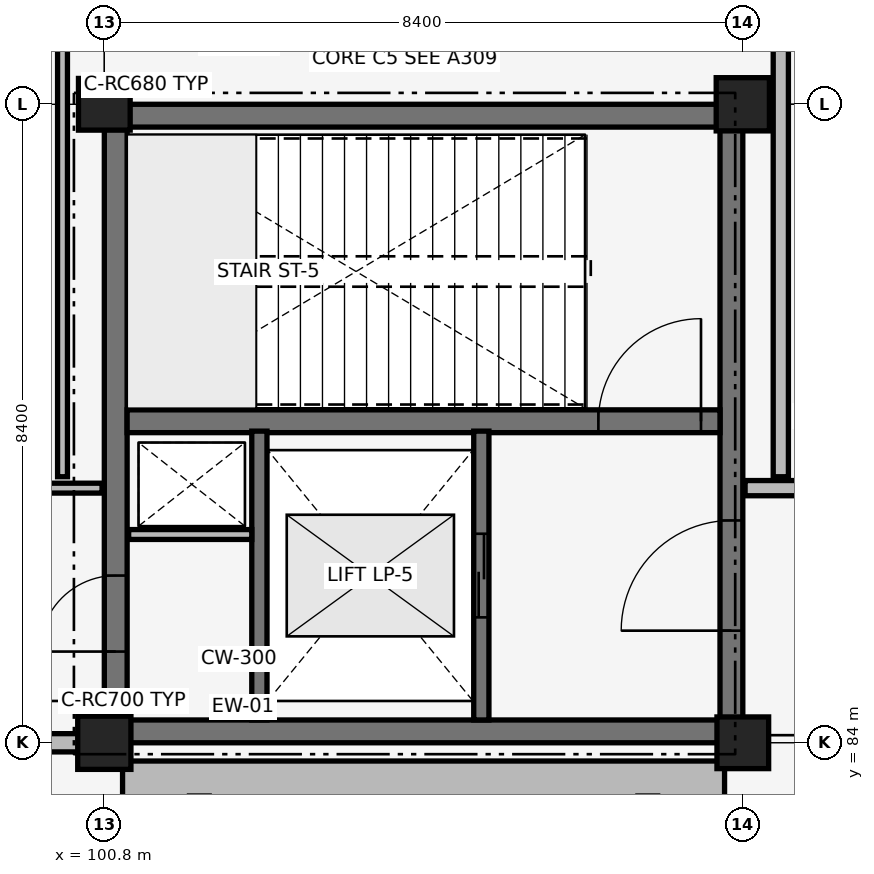
"""IFC4 building model, lengths in metres.
Left out: names, types, materials, properties, quantities, classifications, styles, units other than length and angle.
Written with IfcOpenShell. Run it as: python <this file> out.ifc"""

import sys

from ifc_helpers import new_model, si_unit, direction, frame, frame_2d, origin, origin_2d, place, context, subcontext, project, spatial, rectangle, extrude, element, fill, save


model = new_model("IFC4")
c1 = context("Model", 3, precision=1e-05, world=origin(), true_north=direction((0.0, 1.0)))
c2 = subcontext(c1, "Body", "Model", "MODEL_VIEW")
j1 = project(units=[si_unit("LENGTHUNIT", "METRE"), si_unit("PLANEANGLEUNIT", "RADIAN")], contexts=[c1])
p1 = place(None, origin())
s1 = spatial("IfcSite", under=j1, at=p1, CompositionType="ELEMENT")
p2 = place(p1, origin())
s2 = spatial("IfcBuilding", under=s1, at=p2, CompositionType="ELEMENT")
p3 = place(p2, origin())
s3 = spatial("IfcBuildingStorey", under=s2, at=p3, CompositionType="ELEMENT", Elevation=0.0)
for number, where, z_axis, x_axis in (
    (1, (100.95, 84.15, 0.0), (0.0, 0.0, 1.0), (1.0, 0.0, 0.0)),
    (2, (100.95, 92.25, 0.0), (0.0, 0.0, 1.0), (1.0, 0.0, 0.0)),
):
    element("IfcWall", number, at=place(p3, frame(where, z_axis=z_axis, x_axis=x_axis)), inside=s3, PredefinedType="SHEAR", context=c2, shape_type="SweptSolid", body=[
        extrude(rectangle(XDim=8.1, YDim=0.3, at=frame_2d((4.05, 0.0))), origin(), (0.0, 0.0, 1.0), 5.14),
    ])
p4 = place(p3, frame((100.95, 84.15, 0.0), z_axis=(0.0, 0.0, 1.0), x_axis=(0.0, 1.0, 0.0)))
e3 = element("IfcWall", 3, at=p4, inside=s3, PredefinedType="SHEAR", context=c2, shape_type="SweptSolid", body=[
    extrude(rectangle(XDim=8.1, YDim=0.3, at=frame_2d((4.05, 0.0))), origin(), (0.0, 0.0, 1.0), 5.14),
])
p5 = place(p4, frame((1.05, 0.0, 0.0)))
e4 = element("IfcOpeningElement", 4, at=p5, cuts=e3, PredefinedType="OPENING", context=c2, shape_type="SweptSolid", body=[
    extrude(rectangle(XDim=1.0, YDim=2.15, at=frame_2d((0.5, 1.075))), frame((0.0, 0.16, 0.0), z_axis=(0.0, -1.0, 0.0), x_axis=(1.0, 0.0, 0.0)), (0.0, 0.0, 1.0), 0.32),
])
p6 = place(p3, frame((109.05, 84.15, 0.0), z_axis=(0.0, 0.0, 1.0), x_axis=(0.0, 1.0, 0.0)))
e5 = element("IfcWall", 5, at=p6, inside=s3, PredefinedType="SHEAR", context=c2, shape_type="SweptSolid", body=[
    extrude(rectangle(XDim=8.1, YDim=0.3, at=frame_2d((4.05, 0.0))), origin(), (0.0, 0.0, 1.0), 5.14),
])
p7 = place(p6, frame((1.325, 0.0, 0.0)))
e6 = element("IfcOpeningElement", 6, at=p7, cuts=e5, PredefinedType="OPENING", context=c2, shape_type="SweptSolid", body=[
    extrude(rectangle(XDim=1.45, YDim=2.15, at=frame_2d((0.725, 1.075))), frame((0.0, 0.16, 0.0), z_axis=(0.0, -1.0, 0.0), x_axis=(1.0, 0.0, 0.0)), (0.0, 0.0, 1.0), 0.32),
])
p8 = place(p3, frame((101.1, 88.23, 0.0), z_axis=(0.0, 0.0, 1.0), x_axis=(1.0, 0.0, 0.0)))
e7 = element("IfcWall", 7, at=p8, inside=s3, PredefinedType="SHEAR", context=c2, shape_type="SweptSolid", body=[
    extrude(rectangle(XDim=7.8, YDim=0.3, at=frame_2d((3.9, 0.0))), origin(), (0.0, 0.0, 1.0), 5.14),
])
p9 = place(p8, frame((6.2, 0.0, 0.0)))
e8 = element("IfcOpeningElement", 8, at=p9, cuts=e7, PredefinedType="OPENING", context=c2, shape_type="SweptSolid", body=[
    extrude(rectangle(XDim=1.35, YDim=2.15, at=frame_2d((0.675, 1.075))), frame((0.0, 0.16, 0.0), z_axis=(0.0, -1.0, 0.0), x_axis=(1.0, 0.0, 0.0)), (0.0, 0.0, 1.0), 0.32),
])
p10 = place(p3, frame((100.8, 84.0, 0.0), z_axis=(0.0, 0.0, 1.0), x_axis=(1.0, 0.0, 0.0)))
e9 = element("IfcColumn", 9, at=p10, inside=s3, PredefinedType="COLUMN", context=c2, shape_type="SweptSolid", body=[
    extrude(rectangle(XDim=0.7, YDim=0.7, at=origin_2d()), origin(), (0.0, 0.0, 1.0), 5.14),
])
for number, where, z_axis, x_axis in (
    (10, (100.8, 92.4, 0.0), (0.0, 0.0, 1.0), (1.0, 0.0, 0.0)),
    (11, (109.2, 84.0, 0.0), (0.0, 0.0, 1.0), (1.0, 0.0, 0.0)),
):
    element("IfcColumn", number, at=place(p3, frame(where, z_axis=z_axis, x_axis=x_axis)), inside=s3, PredefinedType="COLUMN", context=c2, shape_type="SweptSolid", body=[
        extrude(rectangle(XDim=0.68, YDim=0.68, at=origin_2d()), origin(), (0.0, 0.0, 1.0), 5.14),
    ])
p11 = place(p3, frame((109.2, 92.4, 0.0), z_axis=(0.0, 0.0, 1.0), x_axis=(1.0, 0.0, 0.0)))
e12 = element("IfcColumn", 12, at=p11, inside=s3, PredefinedType="COLUMN", context=c2, shape_type="SweptSolid", body=[
    extrude(rectangle(XDim=0.7, YDim=0.7, at=origin_2d()), origin(), (0.0, 0.0, 1.0), 5.14),
])
p12 = place(p3, frame((92.635, 84.0, 0.0), z_axis=(0.0, 0.0, 1.0), x_axis=(1.0, 0.0, 0.0)))
e13 = element("IfcWall", 13, at=p12, inside=s3, PredefinedType="SOLIDWALL", context=c2, shape_type="SweptSolid", body=[
    extrude(rectangle(XDim=7.83, YDim=0.24, at=frame_2d((3.915, 0.0))), origin(), (0.0, 0.0, 1.0), 4.4),
])
p13 = place(p12, frame((0.803, 0.0, 0.35)))
e14 = element("IfcOpeningElement", 14, at=p13, cuts=e13, PredefinedType="OPENING", context=c2, shape_type="SweptSolid", body=[
    extrude(rectangle(XDim=0.44, YDim=1.25, at=frame_2d((0.22, 0.625))), frame((0.0, 0.13, 0.0), z_axis=(0.0, -1.0, 0.0), x_axis=(1.0, 0.0, 0.0)), (0.0, 0.0, 1.0), 0.26),
])
p14 = place(p12, frame((2.249, 0.0, 0.35)))
e15 = element("IfcOpeningElement", 15, at=p14, cuts=e13, PredefinedType="OPENING", context=c2, shape_type="SweptSolid", body=[
    extrude(rectangle(XDim=0.44, YDim=1.25, at=frame_2d((0.22, 0.625))), frame((0.0, 0.13, 0.0), z_axis=(0.0, -1.0, 0.0), x_axis=(1.0, 0.0, 0.0)), (0.0, 0.0, 1.0), 0.26),
])
p15 = place(p12, frame((3.695, 0.0, 0.35)))
e16 = element("IfcOpeningElement", 16, at=p15, cuts=e13, PredefinedType="OPENING", context=c2, shape_type="SweptSolid", body=[
    extrude(rectangle(XDim=0.44, YDim=1.25, at=frame_2d((0.22, 0.625))), frame((0.0, 0.13, 0.0), z_axis=(0.0, -1.0, 0.0), x_axis=(1.0, 0.0, 0.0)), (0.0, 0.0, 1.0), 0.26),
])
p16 = place(p12, frame((5.141, 0.0, 0.35)))
e17 = element("IfcOpeningElement", 17, at=p16, cuts=e13, PredefinedType="OPENING", context=c2, shape_type="SweptSolid", body=[
    extrude(rectangle(XDim=0.44, YDim=1.25, at=frame_2d((0.22, 0.625))), frame((0.0, 0.13, 0.0), z_axis=(0.0, -1.0, 0.0), x_axis=(1.0, 0.0, 0.0)), (0.0, 0.0, 1.0), 0.26),
])
p17 = place(p12, frame((6.587, 0.0, 0.35)))
e18 = element("IfcOpeningElement", 18, at=p17, cuts=e13, PredefinedType="OPENING", context=c2, shape_type="SweptSolid", body=[
    extrude(rectangle(XDim=0.44, YDim=1.25, at=frame_2d((0.22, 0.625))), frame((0.0, 0.13, 0.0), z_axis=(0.0, -1.0, 0.0), x_axis=(1.0, 0.0, 0.0)), (0.0, 0.0, 1.0), 0.26),
])
p18 = place(p12, frame((0.803, 0.0, 1.8)))
e19 = element("IfcOpeningElement", 19, at=p18, cuts=e13, PredefinedType="OPENING", context=c2, shape_type="SweptSolid", body=[
    extrude(rectangle(XDim=0.44, YDim=1.25, at=frame_2d((0.22, 0.625))), frame((0.0, 0.13, 0.0), z_axis=(0.0, -1.0, 0.0), x_axis=(1.0, 0.0, 0.0)), (0.0, 0.0, 1.0), 0.26),
])
p19 = place(p12, frame((2.249, 0.0, 1.8)))
e20 = element("IfcOpeningElement", 20, at=p19, cuts=e13, PredefinedType="OPENING", context=c2, shape_type="SweptSolid", body=[
    extrude(rectangle(XDim=0.44, YDim=1.25, at=frame_2d((0.22, 0.625))), frame((0.0, 0.13, 0.0), z_axis=(0.0, -1.0, 0.0), x_axis=(1.0, 0.0, 0.0)), (0.0, 0.0, 1.0), 0.26),
])
p20 = place(p12, frame((3.695, 0.0, 1.8)))
e21 = element("IfcOpeningElement", 21, at=p20, cuts=e13, PredefinedType="OPENING", context=c2, shape_type="SweptSolid", body=[
    extrude(rectangle(XDim=0.44, YDim=1.25, at=frame_2d((0.22, 0.625))), frame((0.0, 0.13, 0.0), z_axis=(0.0, -1.0, 0.0), x_axis=(1.0, 0.0, 0.0)), (0.0, 0.0, 1.0), 0.26),
])
p21 = place(p12, frame((5.141, 0.0, 1.8)))
e22 = element("IfcOpeningElement", 22, at=p21, cuts=e13, PredefinedType="OPENING", context=c2, shape_type="SweptSolid", body=[
    extrude(rectangle(XDim=0.44, YDim=1.25, at=frame_2d((0.22, 0.625))), frame((0.0, 0.13, 0.0), z_axis=(0.0, -1.0, 0.0), x_axis=(1.0, 0.0, 0.0)), (0.0, 0.0, 1.0), 0.26),
])
p22 = place(p12, frame((6.587, 0.0, 1.8)))
e23 = element("IfcOpeningElement", 23, at=p22, cuts=e13, PredefinedType="OPENING", context=c2, shape_type="SweptSolid", body=[
    extrude(rectangle(XDim=0.44, YDim=1.25, at=frame_2d((0.22, 0.625))), frame((0.0, 0.13, 0.0), z_axis=(0.0, -1.0, 0.0), x_axis=(1.0, 0.0, 0.0)), (0.0, 0.0, 1.0), 0.26),
])
p23 = place(p3, frame((101.04, 83.52, -0.25), z_axis=(0.0, 0.0, 1.0), x_axis=(1.0, 0.0, 0.0)))
e24 = element("IfcWall", 24, at=p23, inside=s3, PredefinedType="SOLIDWALL", context=c2, shape_type="SweptSolid", body=[
    extrude(rectangle(XDim=7.92, YDim=0.48, at=frame_2d((3.96, 0.0))), origin(), (0.0, 0.0, 1.0), 5.69),
])
p24 = place(p3, frame((105.76, 84.3, 0.0), z_axis=(0.0, 0.0, 1.0), x_axis=(0.0, 1.0, 0.0)))
e25 = element("IfcWall", 25, at=p24, inside=s3, PredefinedType="SHEAR", context=c2, shape_type="SweptSolid", body=[
    extrude(rectangle(XDim=3.8, YDim=0.2, at=frame_2d((1.9, 0.0))), origin(), (0.0, 0.0, 1.0), 4.4),
])
p25 = place(p24, frame((1.35, 0.0, 0.0)))
e26 = element("IfcOpeningElement", 26, at=p25, cuts=e25, PredefinedType="OPENING", context=c2, shape_type="SweptSolid", body=[
    extrude(rectangle(XDim=1.1, YDim=2.15, at=frame_2d((0.55, 1.075))), frame((0.0, 0.11, 0.0), z_axis=(0.0, -1.0, 0.0), x_axis=(1.0, 0.0, 0.0)), (0.0, 0.0, 1.0), 0.22),
])
p26 = place(p3, frame((102.84, 84.3, 0.0), z_axis=(0.0, 0.0, 1.0), x_axis=(0.0, 1.0, 0.0)))
e27 = element("IfcWall", 27, at=p26, inside=s3, PredefinedType="SHEAR", context=c2, shape_type="SweptSolid", body=[
    extrude(rectangle(XDim=3.8, YDim=0.2, at=frame_2d((1.9, 0.0))), origin(), (0.0, 0.0, 1.0), 4.4),
])
p27 = place(p3, frame((101.12, 86.74, 0.0), z_axis=(0.0, 0.0, 1.0), x_axis=(1.0, 0.0, 0.0)))
e28 = element("IfcWall", 28, at=p27, inside=s3, PredefinedType="PARTITIONING", context=c2, shape_type="SweptSolid", body=[
    extrude(rectangle(XDim=1.62, YDim=0.13, at=frame_2d((0.81, 0.0))), origin(), (0.0, 0.0, 1.0), 5.14),
])
p28 = place(p3, frame((93.1, 87.35, 0.0), z_axis=(0.0, 0.0, 1.0), x_axis=(1.0, 0.0, 0.0)))
e29 = element("IfcWall", 29, at=p28, inside=s3, PredefinedType="PARTITIONING", context=c2, shape_type="SweptSolid", body=[
    extrude(rectangle(XDim=7.67, YDim=0.13, at=frame_2d((3.835, 0.0))), origin(), (0.0, 0.0, 1.0), 4.49),
])
p29 = place(p28, frame((3.385, 0.0, 0.0)))
e30 = element("IfcOpeningElement", 30, at=p29, cuts=e29, PredefinedType="OPENING", context=c2, shape_type="SweptSolid", body=[
    extrude(rectangle(XDim=0.9, YDim=2.1, at=frame_2d((0.45, 1.05))), frame((0.0, 0.075, 0.0), z_axis=(0.0, -1.0, 0.0), x_axis=(1.0, 0.0, 0.0)), (0.0, 0.0, 1.0), 0.15),
])
p30 = place(p3, frame((100.25, 87.5, 0.0), z_axis=(0.0, 0.0, 1.0), x_axis=(0.0, 1.0, 0.0)))
e31 = element("IfcWall", 31, at=p30, inside=s3, PredefinedType="PARTITIONING", context=c2, shape_type="SweptSolid", body=[
    extrude(rectangle(XDim=8.65, YDim=0.13, at=frame_2d((4.325, 0.0))), origin(), (0.0, 0.0, 1.0), 4.46),
])
p31 = place(p3, frame((109.23, 87.35, 0.0), z_axis=(0.0, 0.0, 1.0), x_axis=(1.0, 0.0, 0.0)))
e32 = element("IfcWall", 32, at=p31, inside=s3, PredefinedType="PARTITIONING", context=c2, shape_type="SweptSolid", body=[
    extrude(rectangle(XDim=16.74, YDim=0.2, at=frame_2d((8.37, 0.0))), origin(), (0.0, 0.0, 1.0), 4.49),
])
p32 = place(p31, frame((7.62, 0.0, 0.0)))
e33 = element("IfcOpeningElement", 33, at=p32, cuts=e32, PredefinedType="OPENING", context=c2, shape_type="SweptSolid", body=[
    extrude(rectangle(XDim=1.5, YDim=2.2, at=frame_2d((0.75, 1.1))), frame((0.0, 0.11, 0.0), z_axis=(0.0, -1.0, 0.0), x_axis=(1.0, 0.0, 0.0)), (0.0, 0.0, 1.0), 0.22),
])
p33 = place(p3, frame((109.7, 87.5, 0.0), z_axis=(0.0, 0.0, 1.0), x_axis=(0.0, 1.0, 0.0)))
e34 = element("IfcWall", 34, at=p33, inside=s3, PredefinedType="PARTITIONING", context=c2, shape_type="SweptSolid", body=[
    extrude(rectangle(XDim=29.92, YDim=0.2, at=frame_2d((14.96, 0.0))), origin(), (0.0, 0.0, 1.0), 4.36),
])
p34 = place(p9, origin())
e35 = element("IfcDoor", 35, at=p34, inside=s3, OperationType="SINGLE_SWING_RIGHT", PredefinedType="DOOR", context=c2, shape_type="SweptSolid", body=[
    extrude(rectangle(XDim=1.35, YDim=2.15, at=frame_2d((0.675, 1.075))), frame((0.0, 0.025, 0.0), z_axis=(0.0, -1.0, 0.0), x_axis=(1.0, 0.0, 0.0)), (0.0, 0.0, 1.0), 0.05),
])
fill(e8, e35)
p35 = place(p25, origin())
e36 = element("IfcDoor", 36, at=p35, inside=s3, OperationType="SLIDING_TO_LEFT", PredefinedType="DOOR", context=c2, shape_type="SweptSolid", body=[
    extrude(rectangle(XDim=1.1, YDim=2.15, at=frame_2d((0.55, 1.075))), frame((0.0, 0.025, 0.0), z_axis=(0.0, -1.0, 0.0), x_axis=(1.0, 0.0, 0.0)), (0.0, 0.0, 1.0), 0.05),
])
fill(e26, e36)
p36 = place(p7, origin())
e37 = element("IfcDoor", 37, at=p36, inside=s3, OperationType="DOUBLE_DOOR_SINGLE_SWING", PredefinedType="DOOR", context=c2, shape_type="SweptSolid", body=[
    extrude(rectangle(XDim=1.45, YDim=2.15, at=frame_2d((0.725, 1.075))), frame((0.0, 0.025, 0.0), z_axis=(0.0, -1.0, 0.0), x_axis=(1.0, 0.0, 0.0)), (0.0, 0.0, 1.0), 0.05),
])
fill(e6, e37)
p37 = place(p5, origin())
e38 = element("IfcDoor", 38, at=p37, inside=s3, OperationType="SINGLE_SWING_LEFT", PredefinedType="DOOR", context=c2, shape_type="SweptSolid", body=[
    extrude(rectangle(XDim=1.0, YDim=2.15, at=frame_2d((0.5, 1.075))), frame((0.0, 0.025, 0.0), z_axis=(0.0, -1.0, 0.0), x_axis=(1.0, 0.0, 0.0)), (0.0, 0.0, 1.0), 0.05),
])
fill(e4, e38)
save(model, sys.argv[1])
